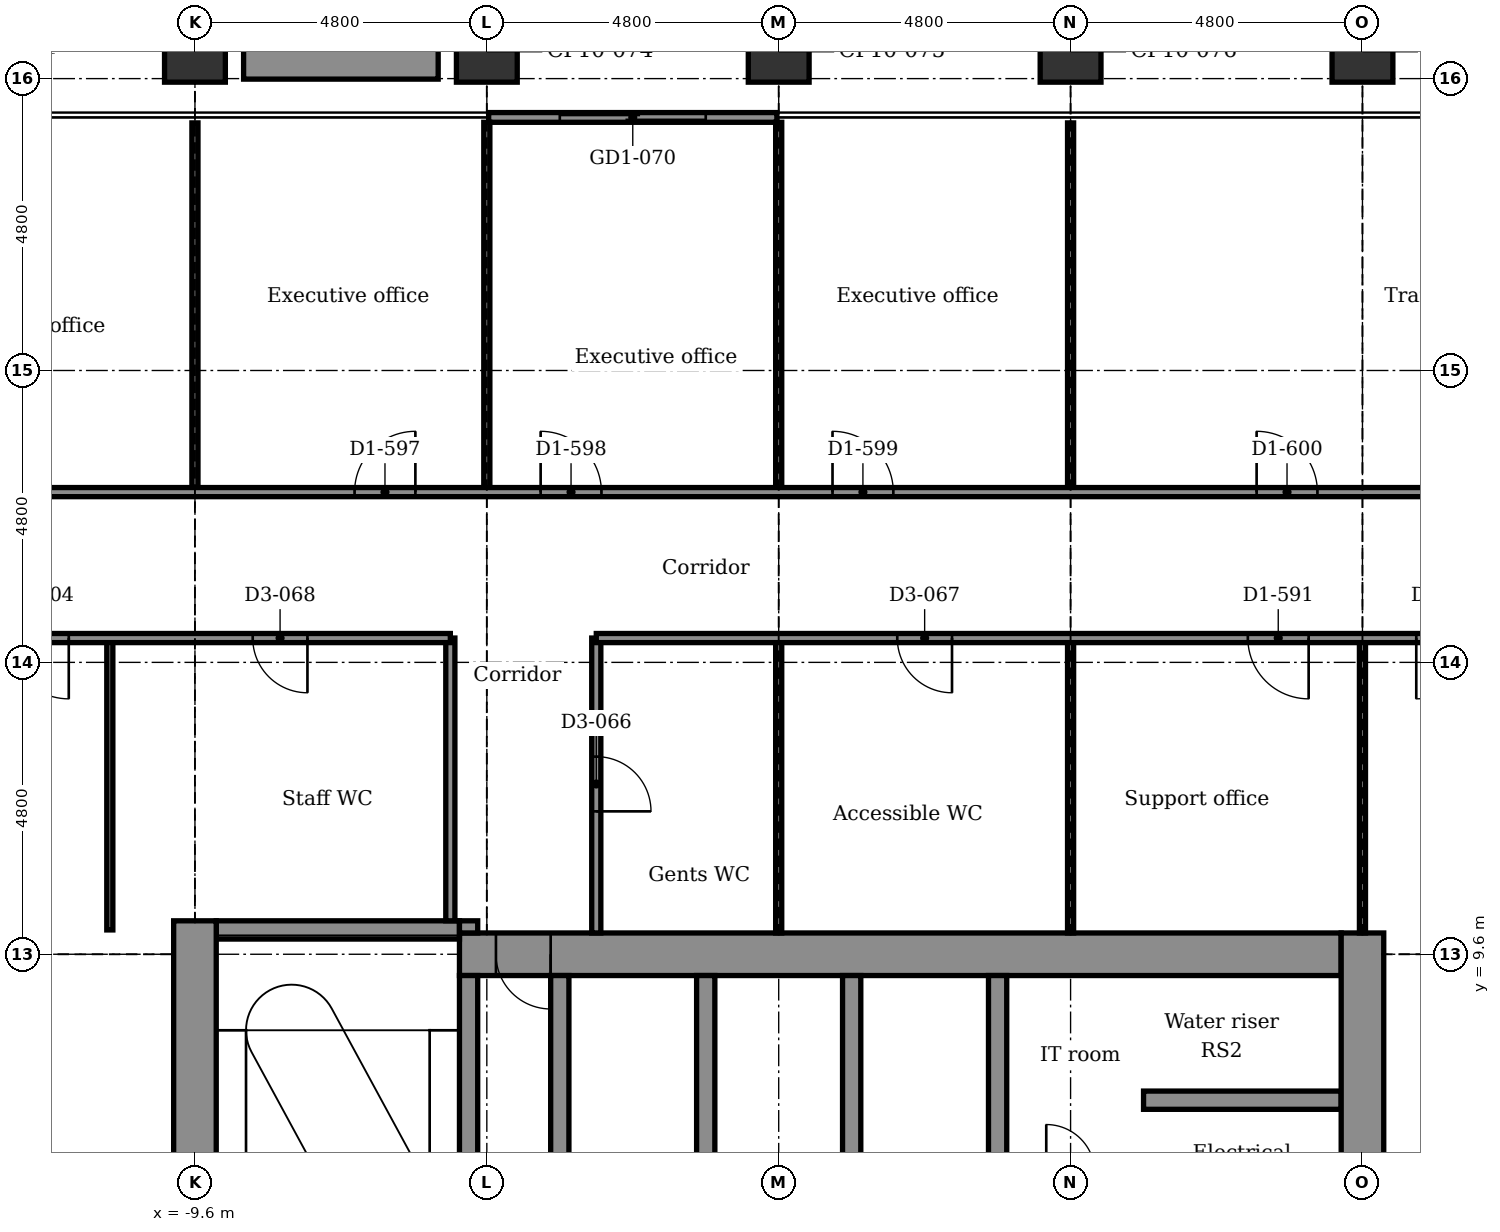
"""IFC4 building model, lengths in metres.
Left out: names, types, materials, properties, quantities, classifications, styles, units other than length and angle.
Written with IfcOpenShell. Run it as: python <this file> out.ifc"""

import sys

from ifc_helpers import new_model, si_unit, direction, frame, frame_2d, origin, origin_2d, place, context, subcontext, project, spatial, rectangle, extrude, element, fill, save


model = new_model("IFC4")
c1 = context("Model", 3, precision=1e-05, world=origin(), true_north=direction((0.0, 1.0)))
c2 = subcontext(c1, "Body", "Model", "MODEL_VIEW")
j1 = project(units=[si_unit("LENGTHUNIT", "METRE"), si_unit("PLANEANGLEUNIT", "RADIAN")], contexts=[c1])
p1 = place(None, origin())
s1 = spatial("IfcSite", under=j1, at=p1, CompositionType="ELEMENT")
p2 = place(p1, origin())
s2 = spatial("IfcBuilding", under=s1, at=p2, CompositionType="ELEMENT")
p3 = place(p2, frame((0.0, 0.0, 212.9)))
s3 = spatial("IfcBuildingStorey", under=s2, at=p3, CompositionType="ELEMENT", Elevation=212.9)
for number, where, z_axis, x_axis in (
    (1, (-9.6, 24.442, -0.15), (0.0, 0.0, 1.0), (1.0, 0.0, 0.0)),
    (2, (-4.8, 24.442, -0.15), (0.0, 0.0, 1.0), (1.0, 0.0, 0.0)),
    (3, (0.0, 24.442, -0.15), (0.0, 0.0, 1.0), (1.0, 0.0, 0.0)),
    (4, (4.8, 24.442, -0.15), (0.0, 0.0, 1.0), (1.0, 0.0, 0.0)),
    (5, (9.6, 24.442, -0.15), (0.0, 0.0, 1.0), (1.0, 0.0, 0.0)),
):
    element("IfcColumn", number, at=place(p3, frame(where, z_axis=z_axis, x_axis=x_axis)), inside=s3, PredefinedType="COLUMN", context=c2, shape_type="SweptSolid", body=[
        extrude(rectangle(XDim=1.0, YDim=1.0, at=origin_2d()), origin(), (0.0, 0.0, 1.0), 3.75),
    ])
p4 = place(p3, frame((6.0, 7.2, -0.15), z_axis=(0.0, 0.0, 1.0), x_axis=(1.0, 0.0, 0.0)))
e6 = element("IfcWall", 6, at=p4, inside=s3, PredefinedType="STANDARD", context=c2, shape_type="SweptSolid", body=[
    extrude(rectangle(XDim=3.25, YDim=0.3, at=frame_2d((1.625, 0.0))), origin(), (0.0, 0.0, 1.0), 3.75),
])
p5 = place(p3, frame((-5.25, 9.6, -0.15), z_axis=(0.0, 0.0, 1.0), x_axis=(1.0, 0.0, 0.0)))
e7 = element("IfcWall", 7, at=p5, inside=s3, PredefinedType="SHEAR", context=c2, shape_type="SweptSolid", body=[
    extrude(rectangle(XDim=14.5, YDim=0.7, at=frame_2d((7.25, 0.0))), origin(), (0.0, 0.0, 1.0), 3.75),
])
p6 = place(p5, frame((0.6, 0.0, 0.15)))
e8 = element("IfcOpeningElement", 8, at=p6, cuts=e7, PredefinedType="OPENING", context=c2, shape_type="SweptSolid", body=[
    extrude(rectangle(XDim=0.9, YDim=2.1, at=frame_2d((0.45, 1.05))), frame((0.0, 0.36, 0.0), z_axis=(0.0, -1.0, 0.0), x_axis=(1.0, 0.0, 0.0)), (0.0, 0.0, 1.0), 0.72),
])
p7 = place(p3, frame((-9.25, 10.0, -0.15), z_axis=(0.0, 0.0, 1.0), x_axis=(1.0, 0.0, 0.0)))
e9 = element("IfcWall", 9, at=p7, inside=s3, PredefinedType="STANDARD", context=c2, shape_type="SweptSolid", body=[
    extrude(rectangle(XDim=4.0, YDim=0.3, at=frame_2d((2.0, 0.0))), origin(), (0.0, 0.0, 1.0), 3.75),
])
p8 = place(p3, frame((-9.6, 2.55, -0.15), z_axis=(0.0, 0.0, 1.0), x_axis=(0.0, 1.0, 0.0)))
e10 = element("IfcWall", 10, at=p8, inside=s3, PredefinedType="SHEAR", context=c2, shape_type="SweptSolid", body=[
    extrude(rectangle(XDim=7.6, YDim=0.7, at=frame_2d((3.8, 0.0))), origin(), (0.0, 0.0, 1.0), 3.75),
])
p9 = place(p3, frame((-5.1, 2.25, -0.15), z_axis=(0.0, 0.0, 1.0), x_axis=(0.0, 1.0, 0.0)))
e11 = element("IfcWall", 11, at=p9, inside=s3, PredefinedType="STANDARD", context=c2, shape_type="SweptSolid", body=[
    extrude(rectangle(XDim=7.0, YDim=0.3, at=frame_2d((3.5, 0.0))), origin(), (0.0, 0.0, 1.0), 3.75),
])
p10 = place(p9, frame((2.0, 0.0, 0.15)))
e12 = element("IfcOpeningElement", 12, at=p10, cuts=e11, PredefinedType="OPENING", context=c2, shape_type="SweptSolid", body=[
    extrude(rectangle(XDim=1.2, YDim=2.1, at=frame_2d((0.6, 1.05))), frame((0.0, 0.16, 0.0), z_axis=(0.0, -1.0, 0.0), x_axis=(1.0, 0.0, 0.0)), (0.0, 0.0, 1.0), 0.32),
])
p11 = place(p3, frame((-5.1, 9.95, -0.15), z_axis=(0.0, 0.0, 1.0), x_axis=(0.0, 1.0, 0.0)))
e13 = element("IfcWall", 13, at=p11, inside=s3, PredefinedType="STANDARD", context=c2, shape_type="SweptSolid", body=[
    extrude(rectangle(XDim=0.2, YDim=0.3, at=frame_2d((0.1, 0.0))), origin(), (0.0, 0.0, 1.0), 3.75),
])
for number, where, z_axis, x_axis in (
    (14, (-3.6, 5.85, -0.15), (0.0, 0.0, 1.0), (0.0, 1.0, 0.0)),
    (15, (-1.2, 5.85, -0.15), (0.0, 0.0, 1.0), (0.0, 1.0, 0.0)),
    (16, (1.2, 5.85, -0.15), (0.0, 0.0, 1.0), (0.0, 1.0, 0.0)),
    (17, (3.6, 5.85, -0.15), (0.0, 0.0, 1.0), (0.0, 1.0, 0.0)),
):
    element("IfcWall", number, at=place(p3, frame(where, z_axis=z_axis, x_axis=x_axis)), inside=s3, PredefinedType="STANDARD", context=c2, shape_type="SweptSolid", body=[
        extrude(rectangle(XDim=3.4, YDim=0.3, at=frame_2d((1.7, 0.0))), origin(), (0.0, 0.0, 1.0), 3.75),
    ])
p12 = place(p3, frame((9.6, -10.15, -0.15), z_axis=(0.0, 0.0, 1.0), x_axis=(0.0, 1.0, 0.0)))
e18 = element("IfcWall", 18, at=p12, inside=s3, PredefinedType="SHEAR", context=c2, shape_type="SweptSolid", body=[
    extrude(rectangle(XDim=20.1, YDim=0.7, at=frame_2d((10.05, 0.0))), origin(), (0.0, 0.0, 1.0), 3.75),
])
p13 = place(p3, frame((-4.77, 23.362, 0.0), z_axis=(0.0, 0.0, 1.0), x_axis=(1.0, 0.0, 0.0)))
e19 = element("IfcWall", 19, at=p13, inside=s3, PredefinedType="PARTITIONING", context=c2, shape_type="SweptSolid", body=[
    extrude(rectangle(XDim=4.74, YDim=0.16, at=frame_2d((2.37, 0.0))), origin(), (0.0, 0.0, 1.0), 3.6),
])
p14 = place(p13, frame((1.17, 0.0, 0.0)))
e20 = element("IfcOpeningElement", 20, at=p14, cuts=e19, PredefinedType="OPENING", context=c2, shape_type="SweptSolid", body=[
    extrude(rectangle(XDim=2.4, YDim=2.4, at=frame_2d((1.2, 1.2))), frame((0.0, 0.09, 0.0), z_axis=(0.0, -1.0, 0.0), x_axis=(1.0, 0.0, 0.0)), (0.0, 0.0, 1.0), 0.18),
])
p15 = place(p3, frame((-8.8, 24.292, 0.0), z_axis=(0.0, 0.0, 1.0), x_axis=(1.0, 0.0, 0.0)))
e21 = element("IfcWall", 21, at=p15, inside=s3, PredefinedType="USERDEFINED", context=c2, shape_type="SweptSolid", body=[
    extrude(rectangle(XDim=3.2, YDim=0.6, at=frame_2d((1.6, 0.0))), origin(), (0.0, 0.0, 1.0), 0.7),
])
for number, where, z_axis, x_axis in (
    (22, (9.6, 9.95, 0.0), (0.0, 0.0, 1.0), (0.0, 1.0, 0.0)),
    (23, (4.8, 9.95, 0.0), (0.0, 0.0, 1.0), (0.0, 1.0, 0.0)),
):
    element("IfcWall", number, at=place(p3, frame(where, z_axis=z_axis, x_axis=x_axis)), inside=s3, PredefinedType="PARTITIONING", context=c2, shape_type="SweptSolid", body=[
        extrude(rectangle(XDim=4.85, YDim=0.1, at=frame_2d((2.425, 0.0))), origin(), (0.0, 0.0, 1.0), 2.838),
    ])
p16 = place(p3, frame((4.8, 17.2, 0.0), z_axis=(0.0, 0.0, 1.0), x_axis=(0.0, 1.0, 0.0)))
e24 = element("IfcWall", 24, at=p16, inside=s3, PredefinedType="PARTITIONING", context=c2, shape_type="SweptSolid", body=[
    extrude(rectangle(XDim=6.072, YDim=0.1, at=frame_2d((3.036, 0.0))), origin(), (0.0, 0.0, 1.0), 2.838),
])
p17 = place(p3, frame((0.0, 9.95, 0.0), z_axis=(0.0, 0.0, 1.0), x_axis=(0.0, 1.0, 0.0)))
e25 = element("IfcWall", 25, at=p17, inside=s3, PredefinedType="PARTITIONING", context=c2, shape_type="SweptSolid", body=[
    extrude(rectangle(XDim=4.85, YDim=0.1, at=frame_2d((2.425, 0.0))), origin(), (0.0, 0.0, 1.0), 2.838),
])
p18 = place(p3, frame((0.0, 17.2, 0.0), z_axis=(0.0, 0.0, 1.0), x_axis=(0.0, 1.0, 0.0)))
e26 = element("IfcWall", 26, at=p18, inside=s3, PredefinedType="PARTITIONING", context=c2, shape_type="SweptSolid", body=[
    extrude(rectangle(XDim=6.082, YDim=0.1, at=frame_2d((3.041, 0.0))), origin(), (0.0, 0.0, 1.0), 2.838),
])
p19 = place(p3, frame((-3.0, 9.95, 0.0), z_axis=(0.0, 0.0, 1.0), x_axis=(0.0, 1.0, 0.0)))
e27 = element("IfcWall", 27, at=p19, inside=s3, PredefinedType="PARTITIONING", context=c2, shape_type="SweptSolid", body=[
    extrude(rectangle(XDim=4.85, YDim=0.15, at=frame_2d((2.425, 0.0))), origin(), (0.0, 0.0, 1.0), 3.6),
])
p20 = place(p19, frame((2.0, 0.0, 0.0)))
e28 = element("IfcOpeningElement", 28, at=p20, cuts=e27, PredefinedType="OPENING", context=c2, shape_type="SweptSolid", body=[
    extrude(rectangle(XDim=0.9, YDim=2.1, at=frame_2d((0.45, 1.05))), frame((0.0, 0.085, 0.0), z_axis=(0.0, -1.0, 0.0), x_axis=(1.0, 0.0, 0.0)), (0.0, 0.0, 1.0), 0.17),
])
p21 = place(p3, frame((-4.8, 17.2, 0.0), z_axis=(0.0, 0.0, 1.0), x_axis=(0.0, 1.0, 0.0)))
e29 = element("IfcWall", 29, at=p21, inside=s3, PredefinedType="PARTITIONING", context=c2, shape_type="SweptSolid", body=[
    extrude(rectangle(XDim=6.082, YDim=0.1, at=frame_2d((3.041, 0.0))), origin(), (0.0, 0.0, 1.0), 2.838),
])
p22 = place(p3, frame((-5.4, 10.15, 0.0), z_axis=(0.0, 0.0, 1.0), x_axis=(0.0, 1.0, 0.0)))
e30 = element("IfcWall", 30, at=p22, inside=s3, PredefinedType="PARTITIONING", context=c2, shape_type="SweptSolid", body=[
    extrude(rectangle(XDim=4.65, YDim=0.15, at=frame_2d((2.325, 0.0))), origin(), (0.0, 0.0, 1.0), 3.6),
])
p23 = place(p3, frame((-9.6, 17.2, 0.0), z_axis=(0.0, 0.0, 1.0), x_axis=(0.0, 1.0, 0.0)))
e31 = element("IfcWall", 31, at=p23, inside=s3, PredefinedType="PARTITIONING", context=c2, shape_type="SweptSolid", body=[
    extrude(rectangle(XDim=6.072, YDim=0.1, at=frame_2d((3.036, 0.0))), origin(), (0.0, 0.0, 1.0), 2.838),
])
p24 = place(p3, frame((-11.0, 10.0, 0.0), z_axis=(0.0, 0.0, 1.0), x_axis=(0.0, 1.0, 0.0)))
e32 = element("IfcWall", 32, at=p24, inside=s3, PredefinedType="PARTITIONING", context=c2, shape_type="SweptSolid", body=[
    extrude(rectangle(XDim=4.8, YDim=0.1, at=frame_2d((2.4, 0.0))), origin(), (0.0, 0.0, 1.0), 3.6),
])
p25 = place(p3, frame((-18.385, 14.8, 0.0), z_axis=(0.0, 0.0, 1.0), x_axis=(1.0, 0.0, 0.0)))
e33 = element("IfcWall", 33, at=p25, inside=s3, PredefinedType="PARTITIONING", context=c2, shape_type="SweptSolid", body=[
    extrude(rectangle(XDim=12.985, YDim=0.15, at=frame_2d((6.492, 0.0))), origin(), (0.0, 0.0, 1.0), 3.6),
])
p26 = place(p25, frame((9.735, 0.0, 0.0)))
e34 = element("IfcOpeningElement", 34, at=p26, cuts=e33, PredefinedType="OPENING", context=c2, shape_type="SweptSolid", body=[
    extrude(rectangle(XDim=0.9, YDim=2.1, at=frame_2d((0.45, 1.05))), frame((0.0, 0.085, 0.0), z_axis=(0.0, -1.0, 0.0), x_axis=(1.0, 0.0, 0.0)), (0.0, 0.0, 1.0), 0.17),
])
p27 = place(p25, frame((0.764, 0.0, 0.0)))
e35 = element("IfcOpeningElement", 35, at=p27, cuts=e33, PredefinedType="OPENING", context=c2, shape_type="SweptSolid", body=[
    extrude(rectangle(XDim=1.8, YDim=2.1, at=frame_2d((0.9, 1.05))), frame((0.0, 0.085, 0.0), z_axis=(0.0, -1.0, 0.0), x_axis=(1.0, 0.0, 0.0)), (0.0, 0.0, 1.0), 0.17),
])
p28 = place(p25, frame((5.71, 0.0, 0.0)))
e36 = element("IfcOpeningElement", 36, at=p28, cuts=e33, PredefinedType="OPENING", context=c2, shape_type="SweptSolid", body=[
    extrude(rectangle(XDim=1.0, YDim=2.1, at=frame_2d((0.5, 1.05))), frame((0.0, 0.085, 0.0), z_axis=(0.0, -1.0, 0.0), x_axis=(1.0, 0.0, 0.0)), (0.0, 0.0, 1.0), 0.17),
])
p29 = place(p3, frame((-3.0, 14.8, 0.0), z_axis=(0.0, 0.0, 1.0), x_axis=(1.0, 0.0, 0.0)))
e37 = element("IfcWall", 37, at=p29, inside=s3, PredefinedType="PARTITIONING", context=c2, shape_type="SweptSolid", body=[
    extrude(rectangle(XDim=19.905, YDim=0.15, at=frame_2d((9.953, 0.0))), origin(), (0.0, 0.0, 1.0), 3.6),
])
p30 = place(p29, frame((4.95, 0.0, 0.0)))
e38 = element("IfcOpeningElement", 38, at=p30, cuts=e37, PredefinedType="OPENING", context=c2, shape_type="SweptSolid", body=[
    extrude(rectangle(XDim=0.9, YDim=2.1, at=frame_2d((0.45, 1.05))), frame((0.0, 0.085, 0.0), z_axis=(0.0, -1.0, 0.0), x_axis=(1.0, 0.0, 0.0)), (0.0, 0.0, 1.0), 0.17),
])
p31 = place(p29, frame((10.715, 0.0, 0.0)))
e39 = element("IfcOpeningElement", 39, at=p31, cuts=e37, PredefinedType="OPENING", context=c2, shape_type="SweptSolid", body=[
    extrude(rectangle(XDim=1.0, YDim=2.1, at=frame_2d((0.5, 1.05))), frame((0.0, 0.085, 0.0), z_axis=(0.0, -1.0, 0.0), x_axis=(1.0, 0.0, 0.0)), (0.0, 0.0, 1.0), 0.17),
])
p32 = place(p29, frame((13.485, 0.0, 0.0)))
e40 = element("IfcOpeningElement", 40, at=p32, cuts=e37, PredefinedType="OPENING", context=c2, shape_type="SweptSolid", body=[
    extrude(rectangle(XDim=1.0, YDim=2.1, at=frame_2d((0.5, 1.05))), frame((0.0, 0.085, 0.0), z_axis=(0.0, -1.0, 0.0), x_axis=(1.0, 0.0, 0.0)), (0.0, 0.0, 1.0), 0.17),
])
p33 = place(p3, frame((-16.999, 17.2, 0.0), z_axis=(0.0, 0.0, 1.0), x_axis=(1.0, 0.0, 0.0)))
e41 = element("IfcWall", 41, at=p33, inside=s3, PredefinedType="PARTITIONING", context=c2, shape_type="SweptSolid", body=[
    extrude(rectangle(XDim=33.998, YDim=0.15, at=frame_2d((16.999, 0.0))), origin(), (0.0, 0.0, 1.0), 3.6),
])
p34 = place(p33, frame((1.052, 0.0, 0.0)))
e42 = element("IfcOpeningElement", 42, at=p34, cuts=e41, PredefinedType="OPENING", context=c2, shape_type="SweptSolid", body=[
    extrude(rectangle(XDim=1.0, YDim=2.1, at=frame_2d((0.5, 1.05))), frame((0.0, 0.085, 0.0), z_axis=(0.0, -1.0, 0.0), x_axis=(1.0, 0.0, 0.0)), (0.0, 0.0, 1.0), 0.17),
])
p35 = place(p33, frame((10.024, 0.0, 0.0)))
e43 = element("IfcOpeningElement", 43, at=p35, cuts=e41, PredefinedType="OPENING", context=c2, shape_type="SweptSolid", body=[
    extrude(rectangle(XDim=1.0, YDim=2.1, at=frame_2d((0.5, 1.05))), frame((0.0, 0.085, 0.0), z_axis=(0.0, -1.0, 0.0), x_axis=(1.0, 0.0, 0.0)), (0.0, 0.0, 1.0), 0.17),
])
p36 = place(p33, frame((13.084, 0.0, 0.0)))
e44 = element("IfcOpeningElement", 44, at=p36, cuts=e41, PredefinedType="OPENING", context=c2, shape_type="SweptSolid", body=[
    extrude(rectangle(XDim=1.0, YDim=2.1, at=frame_2d((0.5, 1.05))), frame((0.0, 0.085, 0.0), z_axis=(0.0, -1.0, 0.0), x_axis=(1.0, 0.0, 0.0)), (0.0, 0.0, 1.0), 0.17),
])
p37 = place(p33, frame((17.884, 0.0, 0.0)))
e45 = element("IfcOpeningElement", 45, at=p37, cuts=e41, PredefinedType="OPENING", context=c2, shape_type="SweptSolid", body=[
    extrude(rectangle(XDim=1.0, YDim=2.1, at=frame_2d((0.5, 1.05))), frame((0.0, 0.085, 0.0), z_axis=(0.0, -1.0, 0.0), x_axis=(1.0, 0.0, 0.0)), (0.0, 0.0, 1.0), 0.17),
])
p38 = place(p33, frame((24.858, 0.0, 0.0)))
e46 = element("IfcOpeningElement", 46, at=p38, cuts=e41, PredefinedType="OPENING", context=c2, shape_type="SweptSolid", body=[
    extrude(rectangle(XDim=1.0, YDim=2.1, at=frame_2d((0.5, 1.05))), frame((0.0, 0.085, 0.0), z_axis=(0.0, -1.0, 0.0), x_axis=(1.0, 0.0, 0.0)), (0.0, 0.0, 1.0), 0.17),
])
p39 = place(p14, origin())
e47 = element("IfcDoor", 47, at=p39, inside=s3, OperationType="DOUBLE_DOOR_SLIDING", PredefinedType="DOOR", context=c2, shape_type="SweptSolid", body=[
    extrude(rectangle(XDim=2.4, YDim=2.4, at=frame_2d((1.2, 1.2))), frame((0.0, 0.025, 0.0), z_axis=(0.0, -1.0, 0.0), x_axis=(1.0, 0.0, 0.0)), (0.0, 0.0, 1.0), 0.05),
])
fill(e20, e47)
p40 = place(p20, frame((0.9, 0.0, 0.0), z_axis=(0.0, 0.0, 1.0), x_axis=(-1.0, 0.0, 0.0)))
e48 = element("IfcDoor", 48, at=p40, inside=s3, OperationType="SINGLE_SWING_LEFT", PredefinedType="DOOR", context=c2, shape_type="SweptSolid", body=[
    extrude(rectangle(XDim=0.9, YDim=2.1, at=frame_2d((0.45, 1.05))), frame((0.0, 0.025, 0.0), z_axis=(0.0, -1.0, 0.0), x_axis=(1.0, 0.0, 0.0)), (0.0, 0.0, 1.0), 0.05),
])
fill(e28, e48)
p41 = place(p30, frame((0.9, 0.0, 0.0), z_axis=(0.0, 0.0, 1.0), x_axis=(-1.0, 0.0, 0.0)))
e49 = element("IfcDoor", 49, at=p41, inside=s3, OperationType="SINGLE_SWING_RIGHT", PredefinedType="DOOR", context=c2, shape_type="SweptSolid", body=[
    extrude(rectangle(XDim=0.9, YDim=2.1, at=frame_2d((0.45, 1.05))), frame((0.0, 0.025, 0.0), z_axis=(0.0, -1.0, 0.0), x_axis=(1.0, 0.0, 0.0)), (0.0, 0.0, 1.0), 0.05),
])
fill(e38, e49)
p42 = place(p31, frame((1.0, 0.0, 0.0), z_axis=(0.0, 0.0, 1.0), x_axis=(-1.0, 0.0, 0.0)))
e50 = element("IfcDoor", 50, at=p42, inside=s3, OperationType="SINGLE_SWING_RIGHT", PredefinedType="DOOR", context=c2, shape_type="SweptSolid", body=[
    extrude(rectangle(XDim=1.0, YDim=2.1, at=frame_2d((0.5, 1.05))), frame((0.0, 0.025, 0.0), z_axis=(0.0, -1.0, 0.0), x_axis=(1.0, 0.0, 0.0)), (0.0, 0.0, 1.0), 0.05),
])
fill(e39, e50)
p43 = place(p26, frame((0.9, 0.0, 0.0), z_axis=(0.0, 0.0, 1.0), x_axis=(-1.0, 0.0, 0.0)))
e51 = element("IfcDoor", 51, at=p43, inside=s3, OperationType="SINGLE_SWING_RIGHT", PredefinedType="DOOR", context=c2, shape_type="SweptSolid", body=[
    extrude(rectangle(XDim=0.9, YDim=2.1, at=frame_2d((0.45, 1.05))), frame((0.0, 0.025, 0.0), z_axis=(0.0, -1.0, 0.0), x_axis=(1.0, 0.0, 0.0)), (0.0, 0.0, 1.0), 0.05),
])
fill(e34, e51)
p44 = place(p35, origin())
e52 = element("IfcDoor", 52, at=p44, inside=s3, OperationType="SINGLE_SWING_RIGHT", PredefinedType="DOOR", context=c2, shape_type="SweptSolid", body=[
    extrude(rectangle(XDim=1.0, YDim=2.1, at=frame_2d((0.5, 1.05))), frame((0.0, 0.025, 0.0), z_axis=(0.0, -1.0, 0.0), x_axis=(1.0, 0.0, 0.0)), (0.0, 0.0, 1.0), 0.05),
])
fill(e43, e52)
p45 = place(p36, origin())
e53 = element("IfcDoor", 53, at=p45, inside=s3, OperationType="SINGLE_SWING_LEFT", PredefinedType="DOOR", context=c2, shape_type="SweptSolid", body=[
    extrude(rectangle(XDim=1.0, YDim=2.1, at=frame_2d((0.5, 1.05))), frame((0.0, 0.025, 0.0), z_axis=(0.0, -1.0, 0.0), x_axis=(1.0, 0.0, 0.0)), (0.0, 0.0, 1.0), 0.05),
])
fill(e44, e53)
p46 = place(p37, origin())
e54 = element("IfcDoor", 54, at=p46, inside=s3, OperationType="SINGLE_SWING_LEFT", PredefinedType="DOOR", context=c2, shape_type="SweptSolid", body=[
    extrude(rectangle(XDim=1.0, YDim=2.1, at=frame_2d((0.5, 1.05))), frame((0.0, 0.025, 0.0), z_axis=(0.0, -1.0, 0.0), x_axis=(1.0, 0.0, 0.0)), (0.0, 0.0, 1.0), 0.05),
])
fill(e45, e54)
p47 = place(p38, origin())
e55 = element("IfcDoor", 55, at=p47, inside=s3, OperationType="SINGLE_SWING_LEFT", PredefinedType="DOOR", context=c2, shape_type="SweptSolid", body=[
    extrude(rectangle(XDim=1.0, YDim=2.1, at=frame_2d((0.5, 1.05))), frame((0.0, 0.025, 0.0), z_axis=(0.0, -1.0, 0.0), x_axis=(1.0, 0.0, 0.0)), (0.0, 0.0, 1.0), 0.05),
])
fill(e46, e55)
p48 = place(p32, frame((1.0, 0.0, 0.0), z_axis=(0.0, 0.0, 1.0), x_axis=(-1.0, 0.0, 0.0)))
e56 = element("IfcDoor", 56, at=p48, inside=s3, OperationType="SINGLE_SWING_LEFT", PredefinedType="DOOR", context=c2, shape_type="SweptSolid", body=[
    extrude(rectangle(XDim=1.0, YDim=2.1, at=frame_2d((0.5, 1.05))), frame((0.0, 0.025, 0.0), z_axis=(0.0, -1.0, 0.0), x_axis=(1.0, 0.0, 0.0)), (0.0, 0.0, 1.0), 0.05),
])
fill(e40, e56)
p49 = place(p28, frame((1.0, 0.0, 0.0), z_axis=(0.0, 0.0, 1.0), x_axis=(-1.0, 0.0, 0.0)))
e57 = element("IfcDoor", 57, at=p49, inside=s3, OperationType="SINGLE_SWING_RIGHT", PredefinedType="DOOR", context=c2, shape_type="SweptSolid", body=[
    extrude(rectangle(XDim=1.0, YDim=2.1, at=frame_2d((0.5, 1.05))), frame((0.0, 0.025, 0.0), z_axis=(0.0, -1.0, 0.0), x_axis=(1.0, 0.0, 0.0)), (0.0, 0.0, 1.0), 0.05),
])
fill(e36, e57)
p50 = place(p6, frame((0.9, 0.0, 0.0), z_axis=(0.0, 0.0, 1.0), x_axis=(-1.0, 0.0, 0.0)))
e58 = element("IfcDoor", 58, at=p50, inside=s3, OperationType="SINGLE_SWING_RIGHT", PredefinedType="DOOR", context=c2, shape_type="SweptSolid", body=[
    extrude(rectangle(XDim=0.9, YDim=2.1, at=frame_2d((0.45, 1.05))), frame((0.0, 0.025, 0.0), z_axis=(0.0, -1.0, 0.0), x_axis=(1.0, 0.0, 0.0)), (0.0, 0.0, 1.0), 0.05),
])
fill(e8, e58)
save(model, sys.argv[1])
